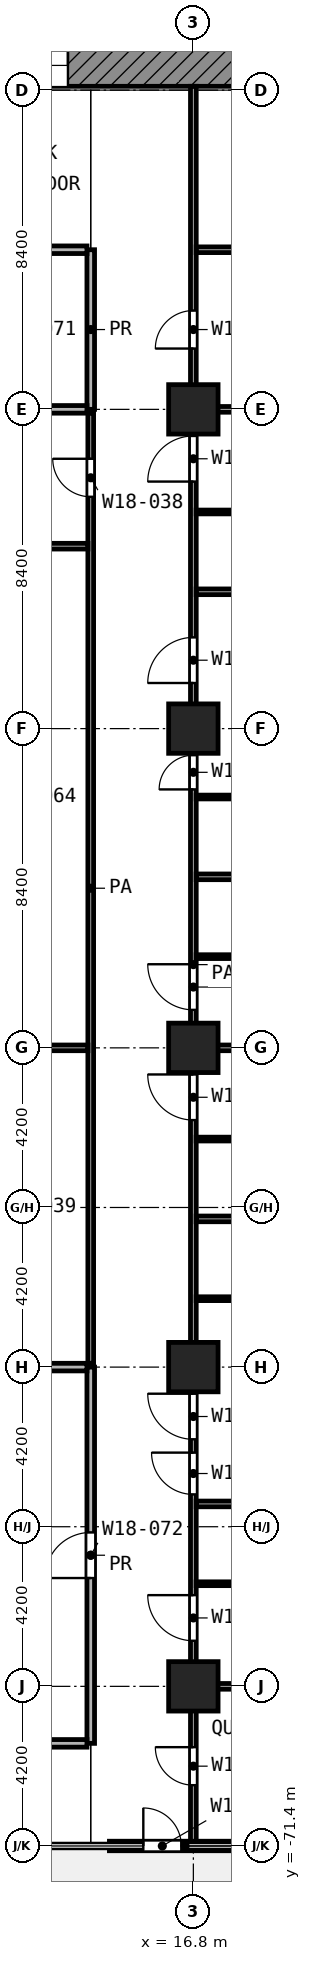
"""IFC4 building model, lengths in metres.
Left out: names, types, materials, properties, quantities, classifications, styles, units other than length and angle.
Written with IfcOpenShell. Run it as: python <this file> out.ifc"""

import sys

from ifc_helpers import new_model, si_unit, direction, frame, frame_2d, origin, origin_2d, place, context, subcontext, project, spatial, rectangle, extrude, element, fill, save


model = new_model("IFC4")
c1 = context("Model", 3, precision=1e-05, world=origin(), true_north=direction((0.0, 1.0)))
c2 = subcontext(c1, "Body", "Model", "MODEL_VIEW")
j1 = project(units=[si_unit("LENGTHUNIT", "METRE"), si_unit("PLANEANGLEUNIT", "RADIAN")], contexts=[c1])
p1 = place(None, origin())
s1 = spatial("IfcSite", under=j1, at=p1, CompositionType="ELEMENT")
p2 = place(p1, origin())
s2 = spatial("IfcBuilding", under=s1, at=p2, CompositionType="ELEMENT")
p3 = place(p2, frame((0.0, 0.0, 81.2)))
s3 = spatial("IfcBuildingStorey", under=s2, at=p3, CompositionType="ELEMENT", Elevation=81.2)
for number, where, z_axis, x_axis in (
    (1, (16.8, -33.6, 0.0), (0.0, 0.0, 1.0), (1.0, 0.0, 0.0)),
    (2, (16.8, -42.0, 0.0), (0.0, 0.0, 1.0), (1.0, 0.0, 0.0)),
    (3, (16.8, -50.4, 0.0), (0.0, 0.0, 1.0), (1.0, 0.0, 0.0)),
    (4, (16.8, -58.8, 0.0), (0.0, 0.0, 1.0), (1.0, 0.0, 0.0)),
    (5, (16.8, -67.2, 0.0), (0.0, 0.0, 1.0), (1.0, 0.0, 0.0)),
):
    element("IfcColumn", number, at=place(p3, frame(where, z_axis=z_axis, x_axis=x_axis)), inside=s3, PredefinedType="COLUMN", context=c2, shape_type="SweptSolid", body=[
        extrude(rectangle(XDim=1.3, YDim=1.3, at=origin_2d()), origin(), (0.0, 0.0, 1.0), 4.2),
    ])
p4 = place(p3, frame((14.592, -71.4, 0.0), z_axis=(0.0, 0.0, 1.0), x_axis=(1.0, 0.0, 0.0)))
e6 = element("IfcWall", 6, at=p4, inside=s3, PredefinedType="SOLIDWALL", context=c2, shape_type="SweptSolid", body=[
    extrude(rectangle(XDim=3.983, YDim=0.25, at=frame_2d((1.992, 0.0))), origin(), (0.0, 0.0, 1.0), 3.78),
])
p5 = place(p4, frame((0.892, 0.0, 0.0)))
e7 = element("IfcOpeningElement", 7, at=p5, cuts=e6, PredefinedType="OPENING", context=c2, shape_type="SweptSolid", body=[
    extrude(rectangle(XDim=1.0, YDim=2.1, at=frame_2d((0.5, 1.05))), frame((0.0, 0.135, 0.0), z_axis=(0.0, -1.0, 0.0), x_axis=(1.0, 0.0, 0.0)), (0.0, 0.0, 1.0), 0.27),
])
p6 = place(p3, frame((5.4, -24.55, 0.0), z_axis=(0.0, 0.0, 1.0), x_axis=(1.0, 0.0, 0.0)))
e8 = element("IfcWall", 8, at=p6, inside=s3, PredefinedType="SHEAR", context=c2, shape_type="SweptSolid", body=[
    extrude(rectangle(XDim=18.6, YDim=1.1, at=frame_2d((9.3, 0.0))), origin(), (0.0, 0.0, 1.0), 3.9),
])
p7 = place(p6, frame((6.3, 0.0, 0.0)))
e9 = element("IfcOpeningElement", 9, at=p7, cuts=e8, PredefinedType="OPENING", context=c2, shape_type="SweptSolid", body=[
    extrude(rectangle(XDim=1.8, YDim=2.1, at=frame_2d((0.9, 1.05))), frame((0.0, 0.56, 0.0), z_axis=(0.0, -1.0, 0.0), x_axis=(1.0, 0.0, 0.0)), (0.0, 0.0, 1.0), 1.12),
])
p8 = place(p3, frame((16.875, -64.5, 0.0), z_axis=(0.0, 0.0, 1.0), x_axis=(1.0, 0.0, 0.0)))
e10 = element("IfcWall", 10, at=p8, inside=s3, PredefinedType="PARTITIONING", context=c2, shape_type="SweptSolid", body=[
    extrude(rectangle(XDim=3.175, YDim=0.1, at=frame_2d((1.587, 0.0))), origin(), (0.0, 0.0, 1.0), 3.9),
])
p9 = place(p3, frame((16.875, -57.0, 0.0), z_axis=(0.0, 0.0, 1.0), x_axis=(1.0, 0.0, 0.0)))
e11 = element("IfcWall", 11, at=p9, inside=s3, PredefinedType="PARTITIONING", context=c2, shape_type="SweptSolid", body=[
    extrude(rectangle(XDim=3.174, YDim=0.1, at=frame_2d((1.587, 0.0))), origin(), (0.0, 0.0, 1.0), 3.9),
])
p10 = place(p3, frame((16.875, -52.8, 0.0), z_axis=(0.0, 0.0, 1.0), x_axis=(1.0, 0.0, 0.0)))
e12 = element("IfcWall", 12, at=p10, inside=s3, PredefinedType="PARTITIONING", context=c2, shape_type="SweptSolid", body=[
    extrude(rectangle(XDim=3.175, YDim=0.1, at=frame_2d((1.587, 0.0))), origin(), (0.0, 0.0, 1.0), 3.9),
])
p11 = place(p3, frame((16.875, -48.0, 0.0), z_axis=(0.0, 0.0, 1.0), x_axis=(1.0, 0.0, 0.0)))
e13 = element("IfcWall", 13, at=p11, inside=s3, PredefinedType="PARTITIONING", context=c2, shape_type="SweptSolid", body=[
    extrude(rectangle(XDim=2.575, YDim=0.1, at=frame_2d((1.288, 0.0))), origin(), (0.0, 0.0, 1.0), 3.9),
])
p12 = place(p3, frame((16.875, -43.8, 0.0), z_axis=(0.0, 0.0, 1.0), x_axis=(1.0, 0.0, 0.0)))
e14 = element("IfcWall", 14, at=p12, inside=s3, PredefinedType="PARTITIONING", context=c2, shape_type="SweptSolid", body=[
    extrude(rectangle(XDim=3.174, YDim=0.1, at=frame_2d((1.587, 0.0))), origin(), (0.0, 0.0, 1.0), 3.9),
])
p13 = place(p3, frame((16.875, -36.3, 0.0), z_axis=(0.0, 0.0, 1.0), x_axis=(1.0, 0.0, 0.0)))
e15 = element("IfcWall", 15, at=p13, inside=s3, PredefinedType="PARTITIONING", context=c2, shape_type="SweptSolid", body=[
    extrude(rectangle(XDim=2.575, YDim=0.1, at=frame_2d((1.288, 0.0))), origin(), (0.0, 0.0, 1.0), 3.9),
])
p14 = place(p3, frame((16.875, -67.2, 0.0), z_axis=(0.0, 0.0, 1.0), x_axis=(1.0, 0.0, 0.0)))
e16 = element("IfcWall", 16, at=p14, inside=s3, PredefinedType="PARTITIONING", context=c2, shape_type="SweptSolid", body=[
    extrude(rectangle(XDim=6.412, YDim=0.15, at=frame_2d((3.206, 0.0))), origin(), (0.0, 0.0, 1.0), 3.9),
])
for number, where, z_axis, x_axis in (
    (17, (16.875, -62.4, 0.0), (0.0, 0.0, 1.0), (1.0, 0.0, 0.0)),
    (18, (16.875, -54.9, 0.0), (0.0, 0.0, 1.0), (1.0, 0.0, 0.0)),
):
    element("IfcWall", number, at=place(p3, frame(where, z_axis=z_axis, x_axis=x_axis)), inside=s3, PredefinedType="PARTITIONING", context=c2, shape_type="SweptSolid", body=[
        extrude(rectangle(XDim=8.245, YDim=0.15, at=frame_2d((4.123, 0.0))), origin(), (0.0, 0.0, 1.0), 3.9),
    ])
p15 = place(p3, frame((11.175, -50.4, 0.0), z_axis=(0.0, 0.0, 1.0), x_axis=(1.0, 0.0, 0.0)))
e19 = element("IfcWall", 19, at=p15, inside=s3, PredefinedType="PARTITIONING", context=c2, shape_type="SweptSolid", body=[
    extrude(rectangle(XDim=2.85, YDim=0.15, at=frame_2d((1.425, 0.0))), origin(), (0.0, 0.0, 1.0), 3.9),
])
for number, where, z_axis, x_axis in (
    (20, (16.875, -50.4, 0.0), (0.0, 0.0, 1.0), (1.0, 0.0, 0.0)),
    (21, (16.875, -45.9, 0.0), (0.0, 0.0, 1.0), (1.0, 0.0, 0.0)),
    (22, (16.875, -38.4, 0.0), (0.0, 0.0, 1.0), (1.0, 0.0, 0.0)),
):
    element("IfcWall", number, at=place(p3, frame(where, z_axis=z_axis, x_axis=x_axis)), inside=s3, PredefinedType="PARTITIONING", context=c2, shape_type="SweptSolid", body=[
        extrude(rectangle(XDim=8.245, YDim=0.15, at=frame_2d((4.123, 0.0))), origin(), (0.0, 0.0, 1.0), 3.9),
    ])
p16 = place(p3, frame((11.175, -37.2, 0.0), z_axis=(0.0, 0.0, 1.0), x_axis=(1.0, 0.0, 0.0)))
e23 = element("IfcWall", 23, at=p16, inside=s3, PredefinedType="PARTITIONING", context=c2, shape_type="SweptSolid", body=[
    extrude(rectangle(XDim=2.85, YDim=0.15, at=frame_2d((1.425, 0.0))), origin(), (0.0, 0.0, 1.0), 3.9),
])
p17 = place(p3, frame((16.875, -33.6, 0.0), z_axis=(0.0, 0.0, 1.0), x_axis=(1.0, 0.0, 0.0)))
e24 = element("IfcWall", 24, at=p17, inside=s3, PredefinedType="PARTITIONING", context=c2, shape_type="SweptSolid", body=[
    extrude(rectangle(XDim=8.245, YDim=0.15, at=frame_2d((4.123, 0.0))), origin(), (0.0, 0.0, 1.0), 3.9),
])
p18 = place(p3, frame((16.875, -29.4, 0.0), z_axis=(0.0, 0.0, 1.0), x_axis=(1.0, 0.0, 0.0)))
e25 = element("IfcWall", 25, at=p18, inside=s3, PredefinedType="PARTITIONING", context=c2, shape_type="SweptSolid", body=[
    extrude(rectangle(XDim=8.25, YDim=0.15, at=frame_2d((4.125, 0.0))), origin(), (0.0, 0.0, 1.0), 3.9),
])
p19 = place(p3, frame((14.1, -58.7, 0.0), z_axis=(0.0, 0.0, 1.0), x_axis=(0.0, 1.0, 0.0)))
e26 = element("IfcWall", 26, at=p19, inside=s3, PredefinedType="PARTITIONING", context=c2, shape_type="SweptSolid", body=[
    extrude(rectangle(XDim=25.0, YDim=0.15, at=frame_2d((12.5, 0.0))), origin(), (0.0, 0.0, 1.0), 3.9),
])
p20 = place(p19, frame((22.8, 0.0, 0.0)))
e27 = element("IfcOpeningElement", 27, at=p20, cuts=e26, PredefinedType="OPENING", context=c2, shape_type="SweptSolid", body=[
    extrude(rectangle(XDim=1.0, YDim=2.1, at=frame_2d((0.5, 1.05))), frame((0.0, 0.085, 0.0), z_axis=(0.0, -1.0, 0.0), x_axis=(1.0, 0.0, 0.0)), (0.0, 0.0, 1.0), 0.17),
])
p21 = place(p3, frame((16.8, -71.32, 0.0), z_axis=(0.0, 0.0, 1.0), x_axis=(0.0, 1.0, 0.0)))
e28 = element("IfcWall", 28, at=p21, inside=s3, PredefinedType="PARTITIONING", context=c2, shape_type="SweptSolid", body=[
    extrude(rectangle(XDim=46.22, YDim=0.15, at=frame_2d((23.11, 0.0))), origin(), (0.0, 0.0, 1.0), 3.9),
])
p22 = place(p21, frame((39.32, 0.0, 0.0)))
e29 = element("IfcOpeningElement", 29, at=p22, cuts=e28, PredefinedType="OPENING", context=c2, shape_type="SweptSolid", body=[
    extrude(rectangle(XDim=1.0, YDim=2.1, at=frame_2d((0.5, 1.05))), frame((0.0, 0.085, 0.0), z_axis=(0.0, -1.0, 0.0), x_axis=(1.0, 0.0, 0.0)), (0.0, 0.0, 1.0), 0.17),
])
p23 = place(p21, frame((35.82, 0.0, 0.0)))
e30 = element("IfcOpeningElement", 30, at=p23, cuts=e28, PredefinedType="OPENING", context=c2, shape_type="SweptSolid", body=[
    extrude(rectangle(XDim=1.2, YDim=2.1, at=frame_2d((0.6, 1.05))), frame((0.0, 0.085, 0.0), z_axis=(0.0, -1.0, 0.0), x_axis=(1.0, 0.0, 0.0)), (0.0, 0.0, 1.0), 0.17),
])
p24 = place(p21, frame((30.52, 0.0, 0.0)))
e31 = element("IfcOpeningElement", 31, at=p24, cuts=e28, PredefinedType="OPENING", context=c2, shape_type="SweptSolid", body=[
    extrude(rectangle(XDim=1.2, YDim=2.1, at=frame_2d((0.6, 1.05))), frame((0.0, 0.085, 0.0), z_axis=(0.0, -1.0, 0.0), x_axis=(1.0, 0.0, 0.0)), (0.0, 0.0, 1.0), 0.17),
])
p25 = place(p21, frame((27.72, 0.0, 0.0)))
e32 = element("IfcOpeningElement", 32, at=p25, cuts=e28, PredefinedType="OPENING", context=c2, shape_type="SweptSolid", body=[
    extrude(rectangle(XDim=0.9, YDim=2.1, at=frame_2d((0.45, 1.05))), frame((0.0, 0.085, 0.0), z_axis=(0.0, -1.0, 0.0), x_axis=(1.0, 0.0, 0.0)), (0.0, 0.0, 1.0), 0.17),
])
p26 = place(p21, frame((21.92, 0.0, 0.0)))
e33 = element("IfcOpeningElement", 33, at=p26, cuts=e28, PredefinedType="OPENING", context=c2, shape_type="SweptSolid", body=[
    extrude(rectangle(XDim=1.2, YDim=2.1, at=frame_2d((0.6, 1.05))), frame((0.0, 0.085, 0.0), z_axis=(0.0, -1.0, 0.0), x_axis=(1.0, 0.0, 0.0)), (0.0, 0.0, 1.0), 0.17),
])
p27 = place(p21, frame((19.02, 0.0, 0.0)))
e34 = element("IfcOpeningElement", 34, at=p27, cuts=e28, PredefinedType="OPENING", context=c2, shape_type="SweptSolid", body=[
    extrude(rectangle(XDim=1.2, YDim=2.1, at=frame_2d((0.6, 1.05))), frame((0.0, 0.085, 0.0), z_axis=(0.0, -1.0, 0.0), x_axis=(1.0, 0.0, 0.0)), (0.0, 0.0, 1.0), 0.17),
])
p28 = place(p21, frame((10.62, 0.0, 0.0)))
e35 = element("IfcOpeningElement", 35, at=p28, cuts=e28, PredefinedType="OPENING", context=c2, shape_type="SweptSolid", body=[
    extrude(rectangle(XDim=1.2, YDim=2.1, at=frame_2d((0.6, 1.05))), frame((0.0, 0.085, 0.0), z_axis=(0.0, -1.0, 0.0), x_axis=(1.0, 0.0, 0.0)), (0.0, 0.0, 1.0), 0.17),
])
p29 = place(p21, frame((9.17, 0.0, 0.0)))
e36 = element("IfcOpeningElement", 36, at=p29, cuts=e28, PredefinedType="OPENING", context=c2, shape_type="SweptSolid", body=[
    extrude(rectangle(XDim=1.1, YDim=2.1, at=frame_2d((0.55, 1.05))), frame((0.0, 0.085, 0.0), z_axis=(0.0, -1.0, 0.0), x_axis=(1.0, 0.0, 0.0)), (0.0, 0.0, 1.0), 0.17),
])
p30 = place(p21, frame((5.32, 0.0, 0.0)))
e37 = element("IfcOpeningElement", 37, at=p30, cuts=e28, PredefinedType="OPENING", context=c2, shape_type="SweptSolid", body=[
    extrude(rectangle(XDim=1.2, YDim=2.1, at=frame_2d((0.6, 1.05))), frame((0.0, 0.085, 0.0), z_axis=(0.0, -1.0, 0.0), x_axis=(1.0, 0.0, 0.0)), (0.0, 0.0, 1.0), 0.17),
])
p31 = place(p21, frame((1.52, 0.0, 0.0)))
e38 = element("IfcOpeningElement", 38, at=p31, cuts=e28, PredefinedType="OPENING", context=c2, shape_type="SweptSolid", body=[
    extrude(rectangle(XDim=1.0, YDim=2.1, at=frame_2d((0.5, 1.05))), frame((0.0, 0.085, 0.0), z_axis=(0.0, -1.0, 0.0), x_axis=(1.0, 0.0, 0.0)), (0.0, 0.0, 1.0), 0.17),
])
for number, where, z_axis, x_axis in (
    (39, (11.2, -68.7, 0.0), (0.0, 0.0, 1.0), (1.0, 0.0, 0.0)),
    (40, (11.2, -58.8, 0.0), (0.0, 0.0, 1.0), (1.0, 0.0, 0.0)),
    (41, (11.2, -33.6, 0.0), (0.0, 0.0, 1.0), (1.0, 0.0, 0.0)),
    (42, (11.2, -29.4, 0.0), (0.0, 0.0, 1.0), (1.0, 0.0, 0.0)),
):
    element("IfcWall", number, at=place(p3, frame(where, z_axis=z_axis, x_axis=x_axis)), inside=s3, PredefinedType="PARTITIONING", context=c2, shape_type="SweptSolid", body=[
        extrude(rectangle(XDim=2.8, YDim=0.2, at=frame_2d((1.4, 0.0))), origin(), (0.0, 0.0, 1.0), 3.9),
    ])
p32 = place(p3, frame((14.1, -68.7, 0.0), z_axis=(0.0, 0.0, 1.0), x_axis=(0.0, 1.0, 0.0)))
e43 = element("IfcWall", 43, at=p32, inside=s3, PredefinedType="PARTITIONING", context=c2, shape_type="SweptSolid", body=[
    extrude(rectangle(XDim=9.9, YDim=0.2, at=frame_2d((4.95, 0.0))), origin(), (0.0, 0.0, 1.0), 3.9),
])
p33 = place(p32, frame((4.35, 0.0, 0.0)))
e44 = element("IfcOpeningElement", 44, at=p33, cuts=e43, PredefinedType="OPENING", context=c2, shape_type="SweptSolid", body=[
    extrude(rectangle(XDim=1.2, YDim=2.1, at=frame_2d((0.6, 1.05))), frame((0.0, 0.11, 0.0), z_axis=(0.0, -1.0, 0.0), x_axis=(1.0, 0.0, 0.0)), (0.0, 0.0, 1.0), 0.22),
])
p34 = place(p3, frame((14.1, -33.6, 0.0), z_axis=(0.0, 0.0, 1.0), x_axis=(0.0, 1.0, 0.0)))
e45 = element("IfcWall", 45, at=p34, inside=s3, PredefinedType="PARTITIONING", context=c2, shape_type="SweptSolid", body=[
    extrude(rectangle(XDim=4.2, YDim=0.2, at=frame_2d((2.1, 0.0))), origin(), (0.0, 0.0, 1.0), 3.9),
])
p35 = place(p5, origin())
e46 = element("IfcDoor", 46, at=p35, inside=s3, OperationType="SINGLE_SWING_LEFT", PredefinedType="DOOR", context=c2, shape_type="SweptSolid", body=[
    extrude(rectangle(XDim=1.0, YDim=2.1, at=frame_2d((0.5, 1.05))), frame((0.0, 0.025, 0.0), z_axis=(0.0, -1.0, 0.0), x_axis=(1.0, 0.0, 0.0)), (0.0, 0.0, 1.0), 0.05),
])
fill(e7, e46)
p36 = place(p7, origin())
e47 = element("IfcDoor", 47, at=p36, inside=s3, OperationType="DOUBLE_DOOR_SINGLE_SWING", PredefinedType="DOOR", context=c2, shape_type="SweptSolid", body=[
    extrude(rectangle(XDim=1.8, YDim=2.1, at=frame_2d((0.9, 1.05))), frame((0.0, 0.025, 0.0), z_axis=(0.0, -1.0, 0.0), x_axis=(1.0, 0.0, 0.0)), (0.0, 0.0, 1.0), 0.05),
])
fill(e9, e47)
p37 = place(p20, origin())
e48 = element("IfcDoor", 48, at=p37, inside=s3, OperationType="SINGLE_SWING_RIGHT", PredefinedType="DOOR", context=c2, shape_type="SweptSolid", body=[
    extrude(rectangle(XDim=1.0, YDim=2.1, at=frame_2d((0.5, 1.05))), frame((0.0, 0.025, 0.0), z_axis=(0.0, -1.0, 0.0), x_axis=(1.0, 0.0, 0.0)), (0.0, 0.0, 1.0), 0.05),
])
fill(e27, e48)
p38 = place(p33, origin())
e49 = element("IfcDoor", 49, at=p38, inside=s3, OperationType="SINGLE_SWING_LEFT", PredefinedType="DOOR", context=c2, shape_type="SweptSolid", body=[
    extrude(rectangle(XDim=1.2, YDim=2.1, at=frame_2d((0.6, 1.05))), frame((0.0, 0.025, 0.0), z_axis=(0.0, -1.0, 0.0), x_axis=(1.0, 0.0, 0.0)), (0.0, 0.0, 1.0), 0.05),
])
fill(e44, e49)
p39 = place(p22, origin())
e50 = element("IfcDoor", 50, at=p39, inside=s3, OperationType="SINGLE_SWING_LEFT", PredefinedType="DOOR", context=c2, shape_type="SweptSolid", body=[
    extrude(rectangle(XDim=1.0, YDim=2.1, at=frame_2d((0.5, 1.05))), frame((0.0, 0.025, 0.0), z_axis=(0.0, -1.0, 0.0), x_axis=(1.0, 0.0, 0.0)), (0.0, 0.0, 1.0), 0.05),
])
fill(e29, e50)
p40 = place(p23, origin())
e51 = element("IfcDoor", 51, at=p40, inside=s3, OperationType="SINGLE_SWING_LEFT", PredefinedType="DOOR", context=c2, shape_type="SweptSolid", body=[
    extrude(rectangle(XDim=1.2, YDim=2.1, at=frame_2d((0.6, 1.05))), frame((0.0, 0.025, 0.0), z_axis=(0.0, -1.0, 0.0), x_axis=(1.0, 0.0, 0.0)), (0.0, 0.0, 1.0), 0.05),
])
fill(e30, e51)
p41 = place(p24, origin())
e52 = element("IfcDoor", 52, at=p41, inside=s3, OperationType="SINGLE_SWING_LEFT", PredefinedType="DOOR", context=c2, shape_type="SweptSolid", body=[
    extrude(rectangle(XDim=1.2, YDim=2.1, at=frame_2d((0.6, 1.05))), frame((0.0, 0.025, 0.0), z_axis=(0.0, -1.0, 0.0), x_axis=(1.0, 0.0, 0.0)), (0.0, 0.0, 1.0), 0.05),
])
fill(e31, e52)
p42 = place(p25, origin())
e53 = element("IfcDoor", 53, at=p42, inside=s3, OperationType="SINGLE_SWING_LEFT", PredefinedType="DOOR", context=c2, shape_type="SweptSolid", body=[
    extrude(rectangle(XDim=0.9, YDim=2.1, at=frame_2d((0.45, 1.05))), frame((0.0, 0.025, 0.0), z_axis=(0.0, -1.0, 0.0), x_axis=(1.0, 0.0, 0.0)), (0.0, 0.0, 1.0), 0.05),
])
fill(e32, e53)
p43 = place(p26, origin())
e54 = element("IfcDoor", 54, at=p43, inside=s3, OperationType="SINGLE_SWING_RIGHT", PredefinedType="DOOR", context=c2, shape_type="SweptSolid", body=[
    extrude(rectangle(XDim=1.2, YDim=2.1, at=frame_2d((0.6, 1.05))), frame((0.0, 0.025, 0.0), z_axis=(0.0, -1.0, 0.0), x_axis=(1.0, 0.0, 0.0)), (0.0, 0.0, 1.0), 0.05),
])
fill(e33, e54)
p44 = place(p27, origin())
e55 = element("IfcDoor", 55, at=p44, inside=s3, OperationType="SINGLE_SWING_RIGHT", PredefinedType="DOOR", context=c2, shape_type="SweptSolid", body=[
    extrude(rectangle(XDim=1.2, YDim=2.1, at=frame_2d((0.6, 1.05))), frame((0.0, 0.025, 0.0), z_axis=(0.0, -1.0, 0.0), x_axis=(1.0, 0.0, 0.0)), (0.0, 0.0, 1.0), 0.05),
])
fill(e34, e55)
p45 = place(p28, origin())
e56 = element("IfcDoor", 56, at=p45, inside=s3, OperationType="SINGLE_SWING_RIGHT", PredefinedType="DOOR", context=c2, shape_type="SweptSolid", body=[
    extrude(rectangle(XDim=1.2, YDim=2.1, at=frame_2d((0.6, 1.05))), frame((0.0, 0.025, 0.0), z_axis=(0.0, -1.0, 0.0), x_axis=(1.0, 0.0, 0.0)), (0.0, 0.0, 1.0), 0.05),
])
fill(e35, e56)
p46 = place(p29, origin())
e57 = element("IfcDoor", 57, at=p46, inside=s3, OperationType="SINGLE_SWING_RIGHT", PredefinedType="DOOR", context=c2, shape_type="SweptSolid", body=[
    extrude(rectangle(XDim=1.1, YDim=2.1, at=frame_2d((0.55, 1.05))), frame((0.0, 0.025, 0.0), z_axis=(0.0, -1.0, 0.0), x_axis=(1.0, 0.0, 0.0)), (0.0, 0.0, 1.0), 0.05),
])
fill(e36, e57)
p47 = place(p30, origin())
e58 = element("IfcDoor", 58, at=p47, inside=s3, OperationType="SINGLE_SWING_RIGHT", PredefinedType="DOOR", context=c2, shape_type="SweptSolid", body=[
    extrude(rectangle(XDim=1.2, YDim=2.1, at=frame_2d((0.6, 1.05))), frame((0.0, 0.025, 0.0), z_axis=(0.0, -1.0, 0.0), x_axis=(1.0, 0.0, 0.0)), (0.0, 0.0, 1.0), 0.05),
])
fill(e37, e58)
p48 = place(p31, origin())
e59 = element("IfcDoor", 59, at=p48, inside=s3, OperationType="SINGLE_SWING_RIGHT", PredefinedType="DOOR", context=c2, shape_type="SweptSolid", body=[
    extrude(rectangle(XDim=1.0, YDim=2.1, at=frame_2d((0.5, 1.05))), frame((0.0, 0.025, 0.0), z_axis=(0.0, -1.0, 0.0), x_axis=(1.0, 0.0, 0.0)), (0.0, 0.0, 1.0), 0.05),
])
fill(e38, e59)
save(model, sys.argv[1])
